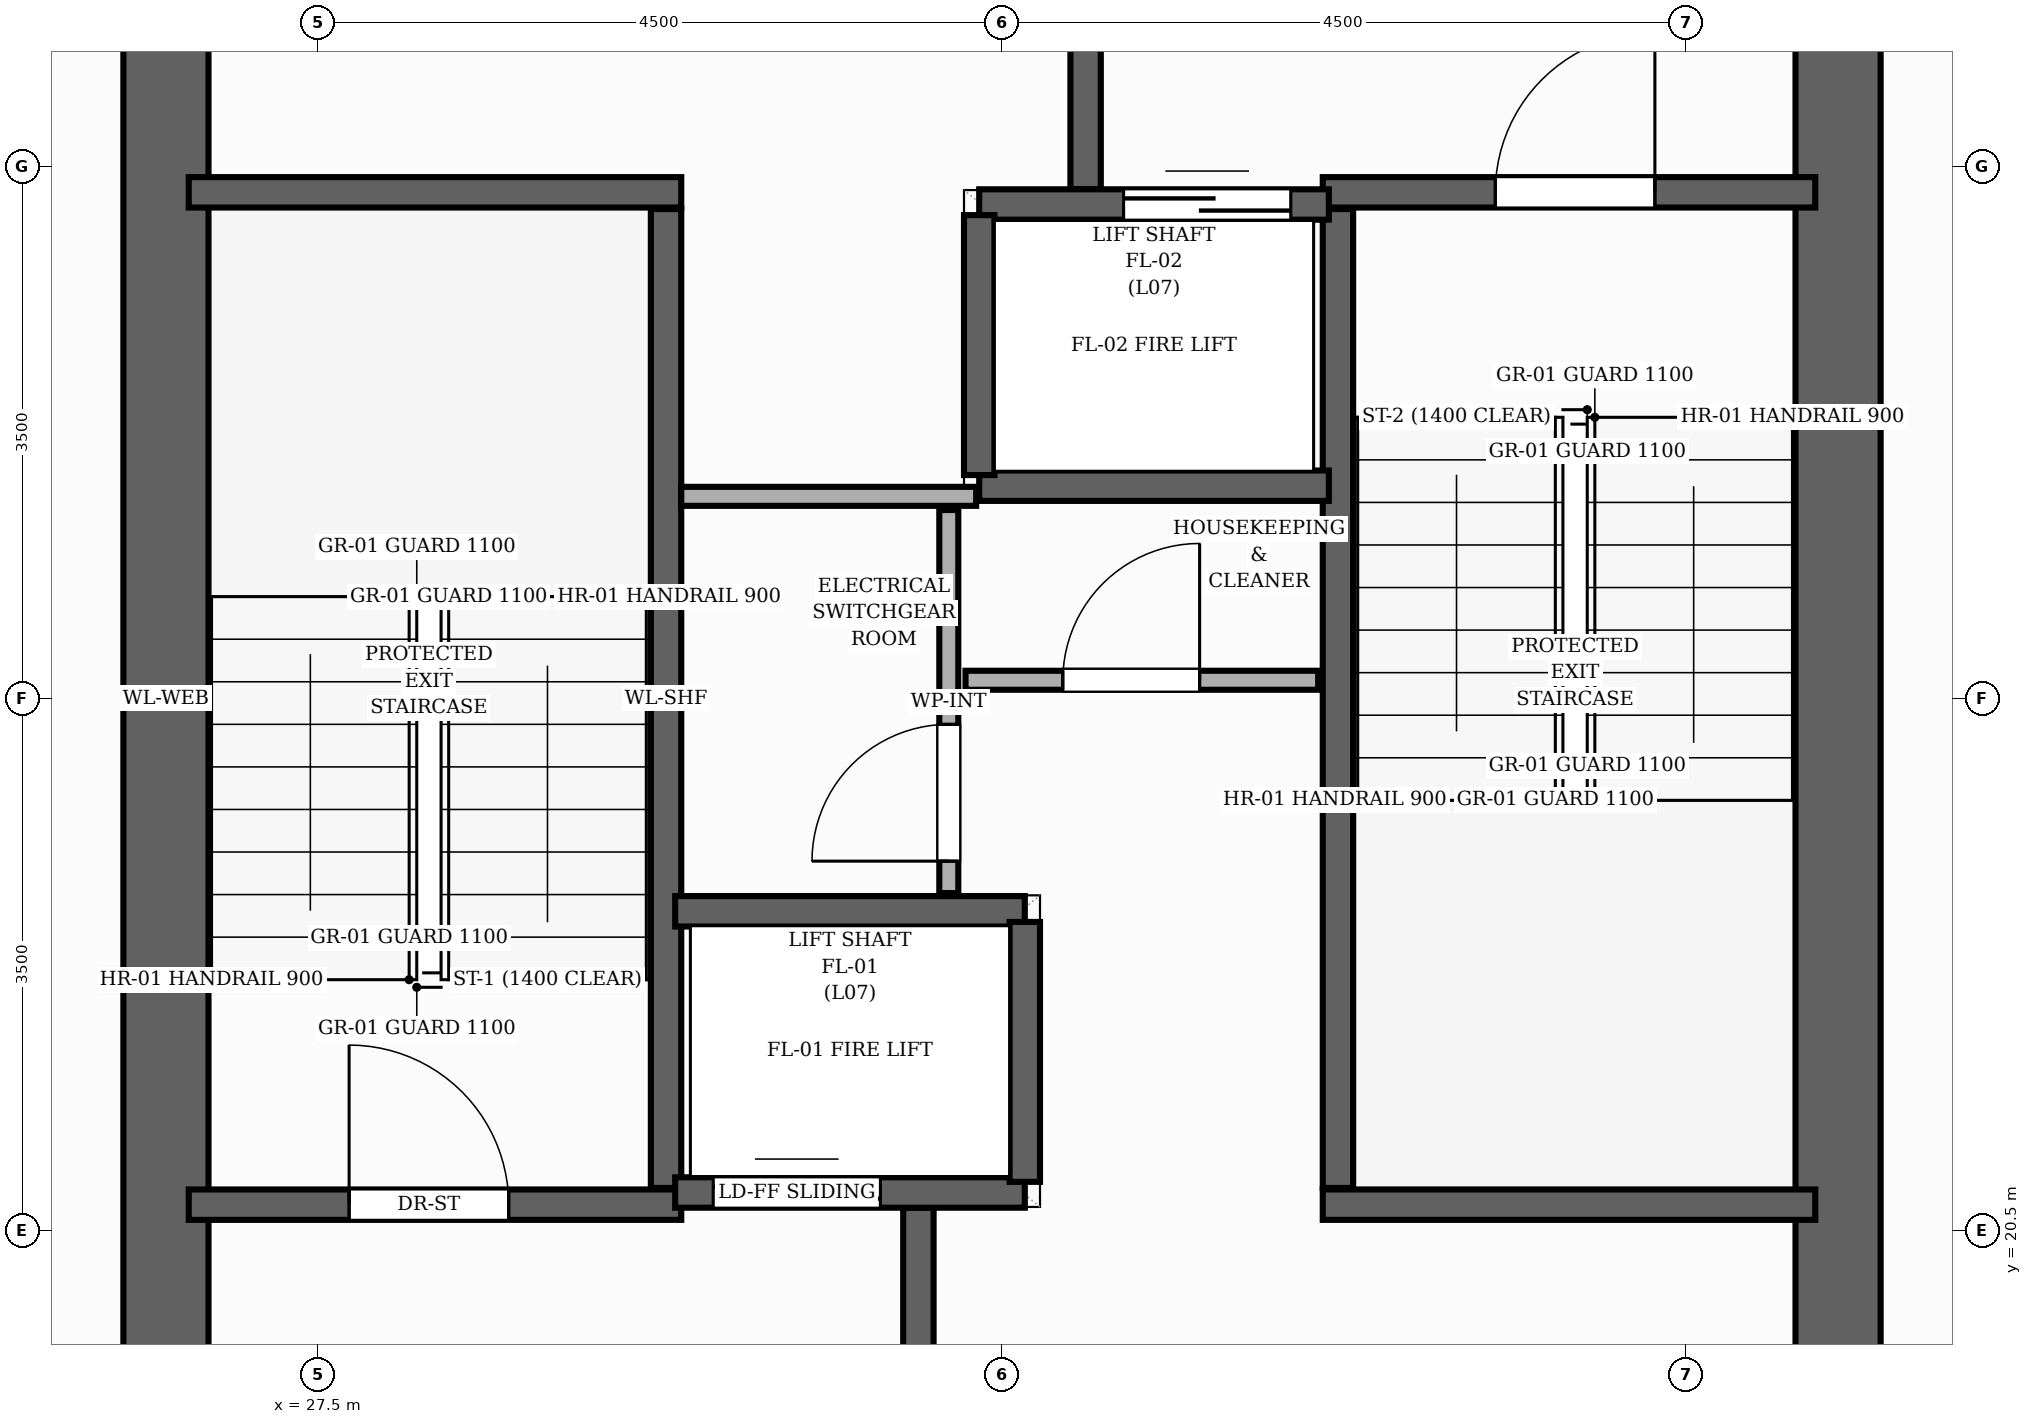
"""IFC4 building model, lengths in metres.
Left out: names, types, materials, properties, quantities, classifications, styles, units other than length and angle.
Written with IfcOpenShell. Run it as: python <this file> out.ifc"""

import sys

from ifc_helpers import new_model, si_unit, direction, frame, frame_2d, origin, place, context, subcontext, project, spatial, rectangle, extrude, element, fill, save


model = new_model("IFC4")
c1 = context("Model", 3, precision=1e-05, world=origin(), true_north=direction((0.0, 1.0)))
c2 = subcontext(c1, "Body", "Model", "MODEL_VIEW")
j1 = project(units=[si_unit("LENGTHUNIT", "METRE"), si_unit("PLANEANGLEUNIT", "RADIAN")], contexts=[c1])
p1 = place(None, origin())
s1 = spatial("IfcSite", under=j1, at=p1, CompositionType="ELEMENT")
p2 = place(p1, origin())
s2 = spatial("IfcBuilding", under=s1, at=p2, CompositionType="ELEMENT")
p3 = place(p2, frame((0.0, 0.0, 24.8)))
s3 = spatial("IfcBuildingStorey", under=s2, at=p3, CompositionType="ELEMENT", Elevation=24.8)
for number, where, z_axis, x_axis in (
    (1, (26.5, 17.4, 0.0), (0.0, 0.0, 1.0), (0.0, 1.0, 0.0)),
    (2, (37.5, 17.4, 0.0), (0.0, 0.0, 1.0), (0.0, 1.0, 0.0)),
):
    element("IfcWall", number, at=place(p3, frame(where, z_axis=z_axis, x_axis=x_axis)), inside=s3, PredefinedType="SHEAR", context=c2, shape_type="SweptSolid", body=[
        extrude(rectangle(XDim=13.2, YDim=0.56, at=frame_2d((6.6, 0.0))), origin(), (0.0, 0.0, 1.0), 3.2),
    ])
p4 = place(p3, frame((29.79, 20.78, 0.0), z_axis=(0.0, 0.0, 1.0), x_axis=(0.0, 1.0, 0.0)))
e3 = element("IfcWall", 3, at=p4, inside=s3, PredefinedType="SHEAR", context=c2, shape_type="SweptSolid", body=[
    extrude(rectangle(XDim=6.44, YDim=0.2, at=frame_2d((3.22, 0.0))), origin(), (0.0, 0.0, 1.0), 3.2),
])
p5 = place(p3, frame((26.65, 27.33, 0.0), z_axis=(0.0, 0.0, 1.0), x_axis=(1.0, 0.0, 0.0)))
e4 = element("IfcWall", 4, at=p5, inside=s3, PredefinedType="SHEAR", context=c2, shape_type="SweptSolid", body=[
    extrude(rectangle(XDim=3.24, YDim=0.2, at=frame_2d((1.62, 0.0))), origin(), (0.0, 0.0, 1.0), 3.2),
])
p6 = place(p3, frame((26.65, 20.67, 0.0), z_axis=(0.0, 0.0, 1.0), x_axis=(1.0, 0.0, 0.0)))
e5 = element("IfcWall", 5, at=p6, inside=s3, PredefinedType="SHEAR", context=c2, shape_type="SweptSolid", body=[
    extrude(rectangle(XDim=3.24, YDim=0.2, at=frame_2d((1.62, 0.0))), origin(), (0.0, 0.0, 1.0), 3.2),
])
p7 = place(p6, frame((1.055, 0.0, 0.0)))
e6 = element("IfcOpeningElement", 6, at=p7, cuts=e5, PredefinedType="OPENING", context=c2, shape_type="SweptSolid", body=[
    extrude(rectangle(XDim=1.05, YDim=2.15, at=frame_2d((0.525, 1.075))), frame((0.0, 0.11, 0.0), z_axis=(0.0, -1.0, 0.0), x_axis=(1.0, 0.0, 0.0)), (0.0, 0.0, 1.0), 0.22),
])
p8 = place(p3, frame((34.21, 20.78, 0.0), z_axis=(0.0, 0.0, 1.0), x_axis=(0.0, 1.0, 0.0)))
e7 = element("IfcWall", 7, at=p8, inside=s3, PredefinedType="SHEAR", context=c2, shape_type="SweptSolid", body=[
    extrude(rectangle(XDim=6.44, YDim=0.2, at=frame_2d((3.22, 0.0))), origin(), (0.0, 0.0, 1.0), 3.2),
])
p9 = place(p3, frame((34.11, 20.67, 0.0), z_axis=(0.0, 0.0, 1.0), x_axis=(1.0, 0.0, 0.0)))
e8 = element("IfcWall", 8, at=p9, inside=s3, PredefinedType="SHEAR", context=c2, shape_type="SweptSolid", body=[
    extrude(rectangle(XDim=3.24, YDim=0.2, at=frame_2d((1.62, 0.0))), origin(), (0.0, 0.0, 1.0), 3.2),
])
p10 = place(p3, frame((34.11, 27.33, 0.0), z_axis=(0.0, 0.0, 1.0), x_axis=(1.0, 0.0, 0.0)))
e9 = element("IfcWall", 9, at=p10, inside=s3, PredefinedType="SHEAR", context=c2, shape_type="SweptSolid", body=[
    extrude(rectangle(XDim=3.24, YDim=0.2, at=frame_2d((1.62, 0.0))), origin(), (0.0, 0.0, 1.0), 3.2),
])
p11 = place(p10, frame((1.135, 0.0, 0.0)))
e10 = element("IfcOpeningElement", 10, at=p11, cuts=e9, PredefinedType="OPENING", context=c2, shape_type="SweptSolid", body=[
    extrude(rectangle(XDim=1.05, YDim=2.15, at=frame_2d((0.525, 1.075))), frame((0.0, 0.11, 0.0), z_axis=(0.0, -1.0, 0.0), x_axis=(1.0, 0.0, 0.0)), (0.0, 0.0, 1.0), 0.22),
])
for number, where, z_axis, x_axis in (
    (11, (31.45, 17.15, 0.0), (0.0, 0.0, 1.0), (0.0, 1.0, 0.0)),
    (12, (32.55, 27.35, 0.0), (0.0, 0.0, 1.0), (0.0, 1.0, 0.0)),
):
    element("IfcWall", number, at=place(p3, frame(where, z_axis=z_axis, x_axis=x_axis)), inside=s3, PredefinedType="SHEAR", context=c2, shape_type="SweptSolid", body=[
        extrude(rectangle(XDim=3.5, YDim=0.2, at=frame_2d((1.75, 0.0))), origin(), (0.0, 0.0, 1.0), 3.2),
    ])
p12 = place(p3, frame((29.85, 20.75, 0.0), z_axis=(0.0, 0.0, 1.0), x_axis=(1.0, 0.0, 0.0)))
e13 = element("IfcWall", 13, at=p12, inside=s3, PredefinedType="SHEAR", context=c2, shape_type="SweptSolid", body=[
    extrude(rectangle(XDim=2.3, YDim=0.2, at=frame_2d((1.15, 0.0))), origin(), (0.0, 0.0, 1.0), 3.2),
])
p13 = place(p12, frame((0.25, 0.0, 0.0)))
e14 = element("IfcOpeningElement", 14, at=p13, cuts=e13, PredefinedType="OPENING", context=c2, shape_type="SweptSolid", body=[
    extrude(rectangle(XDim=1.1, YDim=2.15, at=frame_2d((0.55, 1.075))), frame((0.0, 0.11, 0.0), z_axis=(0.0, -1.0, 0.0), x_axis=(1.0, 0.0, 0.0)), (0.0, 0.0, 1.0), 0.22),
])
p14 = place(p3, frame((29.85, 22.6, 0.0), z_axis=(0.0, 0.0, 1.0), x_axis=(1.0, 0.0, 0.0)))
e15 = element("IfcWall", 15, at=p14, inside=s3, PredefinedType="SHEAR", context=c2, shape_type="SweptSolid", body=[
    extrude(rectangle(XDim=2.3, YDim=0.2, at=frame_2d((1.15, 0.0))), origin(), (0.0, 0.0, 1.0), 3.2),
])
p15 = place(p3, frame((32.15, 20.82, 0.0), z_axis=(0.0, 0.0, 1.0), x_axis=(0.0, 1.0, 0.0)))
e16 = element("IfcWall", 16, at=p15, inside=s3, PredefinedType="SHEAR", context=c2, shape_type="SweptSolid", body=[
    extrude(rectangle(XDim=1.71, YDim=0.2, at=frame_2d((0.855, 0.0))), origin(), (0.0, 0.0, 1.0), 3.2),
])
p16 = place(p3, frame((31.85, 27.25, 0.0), z_axis=(0.0, 0.0, 1.0), x_axis=(1.0, 0.0, 0.0)))
e17 = element("IfcWall", 17, at=p16, inside=s3, PredefinedType="SHEAR", context=c2, shape_type="SweptSolid", body=[
    extrude(rectangle(XDim=2.3, YDim=0.2, at=frame_2d((1.15, 0.0))), origin(), (0.0, 0.0, 1.0), 3.2),
])
p17 = place(p16, frame((0.95, 0.0, 0.0)))
e18 = element("IfcOpeningElement", 18, at=p17, cuts=e17, PredefinedType="OPENING", context=c2, shape_type="SweptSolid", body=[
    extrude(rectangle(XDim=1.1, YDim=2.15, at=frame_2d((0.55, 1.075))), frame((0.0, 0.11, 0.0), z_axis=(0.0, -1.0, 0.0), x_axis=(1.0, 0.0, 0.0)), (0.0, 0.0, 1.0), 0.22),
])
p18 = place(p3, frame((31.85, 25.4, 0.0), z_axis=(0.0, 0.0, 1.0), x_axis=(1.0, 0.0, 0.0)))
e19 = element("IfcWall", 19, at=p18, inside=s3, PredefinedType="SHEAR", context=c2, shape_type="SweptSolid", body=[
    extrude(rectangle(XDim=2.3, YDim=0.2, at=frame_2d((1.15, 0.0))), origin(), (0.0, 0.0, 1.0), 3.2),
])
p19 = place(p3, frame((31.85, 25.47, 0.0), z_axis=(0.0, 0.0, 1.0), x_axis=(0.0, 1.0, 0.0)))
e20 = element("IfcWall", 20, at=p19, inside=s3, PredefinedType="SHEAR", context=c2, shape_type="SweptSolid", body=[
    extrude(rectangle(XDim=1.71, YDim=0.2, at=frame_2d((0.855, 0.0))), origin(), (0.0, 0.0, 1.0), 3.2),
])
p20 = place(p3, frame((31.65, 22.72, 0.0), z_axis=(0.0, 0.0, 1.0), x_axis=(0.0, 1.0, 0.0)))
e21 = element("IfcWall", 21, at=p20, inside=s3, PredefinedType="PARTITIONING", context=c2, shape_type="SweptSolid", body=[
    extrude(rectangle(XDim=2.52, YDim=0.125, at=frame_2d((1.26, 0.0))), origin(), (0.0, 0.0, 1.0), 2.955),
])
p21 = place(p20, frame((0.21, 0.0, 0.0)))
e22 = element("IfcOpeningElement", 22, at=p21, cuts=e21, PredefinedType="OPENING", context=c2, shape_type="SweptSolid", body=[
    extrude(rectangle(XDim=0.9, YDim=2.1, at=frame_2d((0.45, 1.05))), frame((0.0, 0.073, 0.0), z_axis=(0.0, -1.0, 0.0), x_axis=(1.0, 0.0, 0.0)), (0.0, 0.0, 1.0), 0.145),
])
p22 = place(p3, frame((31.76, 24.12, 0.0), z_axis=(0.0, 0.0, 1.0), x_axis=(1.0, 0.0, 0.0)))
e23 = element("IfcWall", 23, at=p22, inside=s3, PredefinedType="PARTITIONING", context=c2, shape_type="SweptSolid", body=[
    extrude(rectangle(XDim=2.32, YDim=0.125, at=frame_2d((1.16, 0.0))), origin(), (0.0, 0.0, 1.0), 2.955),
])
p23 = place(p22, frame((0.64, 0.0, 0.0)))
e24 = element("IfcOpeningElement", 24, at=p23, cuts=e23, PredefinedType="OPENING", context=c2, shape_type="SweptSolid", body=[
    extrude(rectangle(XDim=0.9, YDim=2.1, at=frame_2d((0.45, 1.05))), frame((0.0, 0.073, 0.0), z_axis=(0.0, -1.0, 0.0), x_axis=(1.0, 0.0, 0.0)), (0.0, 0.0, 1.0), 0.145),
])
p24 = place(p3, frame((29.89, 25.33, 0.0), z_axis=(0.0, 0.0, 1.0), x_axis=(1.0, 0.0, 0.0)))
e25 = element("IfcWall", 25, at=p24, inside=s3, PredefinedType="PARTITIONING", context=c2, shape_type="SweptSolid", body=[
    extrude(rectangle(XDim=1.94, YDim=0.125, at=frame_2d((0.97, 0.0))), origin(), (0.0, 0.0, 1.0), 2.955),
])
p25 = place(p7, origin())
e26 = element("IfcDoor", 26, at=p25, inside=s3, OperationType="SINGLE_SWING_LEFT", PredefinedType="DOOR", context=c2, shape_type="SweptSolid", body=[
    extrude(rectangle(XDim=1.05, YDim=2.15, at=frame_2d((0.525, 1.075))), frame((0.0, 0.025, 0.0), z_axis=(0.0, -1.0, 0.0), x_axis=(1.0, 0.0, 0.0)), (0.0, 0.0, 1.0), 0.05),
])
fill(e6, e26)
p26 = place(p11, origin())
e27 = element("IfcDoor", 27, at=p26, inside=s3, OperationType="SINGLE_SWING_RIGHT", PredefinedType="DOOR", context=c2, shape_type="SweptSolid", body=[
    extrude(rectangle(XDim=1.05, YDim=2.15, at=frame_2d((0.525, 1.075))), frame((0.0, 0.025, 0.0), z_axis=(0.0, -1.0, 0.0), x_axis=(1.0, 0.0, 0.0)), (0.0, 0.0, 1.0), 0.05),
])
fill(e10, e27)
p27 = place(p13, origin())
e28 = element("IfcDoor", 28, at=p27, inside=s3, OperationType="DOUBLE_DOOR_SLIDING", PredefinedType="DOOR", context=c2, shape_type="SweptSolid", body=[
    extrude(rectangle(XDim=1.1, YDim=2.15, at=frame_2d((0.55, 1.075))), frame((0.0, 0.025, 0.0), z_axis=(0.0, -1.0, 0.0), x_axis=(1.0, 0.0, 0.0)), (0.0, 0.0, 1.0), 0.05),
])
fill(e14, e28)
p28 = place(p17, origin())
e29 = element("IfcDoor", 29, at=p28, inside=s3, OperationType="DOUBLE_DOOR_SLIDING", PredefinedType="DOOR", context=c2, shape_type="SweptSolid", body=[
    extrude(rectangle(XDim=1.1, YDim=2.15, at=frame_2d((0.55, 1.075))), frame((0.0, 0.025, 0.0), z_axis=(0.0, -1.0, 0.0), x_axis=(1.0, 0.0, 0.0)), (0.0, 0.0, 1.0), 0.05),
])
fill(e18, e29)
p29 = place(p21, origin())
e30 = element("IfcDoor", 30, at=p29, inside=s3, OperationType="SINGLE_SWING_LEFT", PredefinedType="DOOR", context=c2, shape_type="SweptSolid", body=[
    extrude(rectangle(XDim=0.9, YDim=2.1, at=frame_2d((0.45, 1.05))), frame((0.0, 0.025, 0.0), z_axis=(0.0, -1.0, 0.0), x_axis=(1.0, 0.0, 0.0)), (0.0, 0.0, 1.0), 0.05),
])
fill(e22, e30)
p30 = place(p23, origin())
e31 = element("IfcDoor", 31, at=p30, inside=s3, OperationType="SINGLE_SWING_RIGHT", PredefinedType="DOOR", context=c2, shape_type="SweptSolid", body=[
    extrude(rectangle(XDim=0.9, YDim=2.1, at=frame_2d((0.45, 1.05))), frame((0.0, 0.025, 0.0), z_axis=(0.0, -1.0, 0.0), x_axis=(1.0, 0.0, 0.0)), (0.0, 0.0, 1.0), 0.05),
])
fill(e24, e31)
save(model, sys.argv[1])
